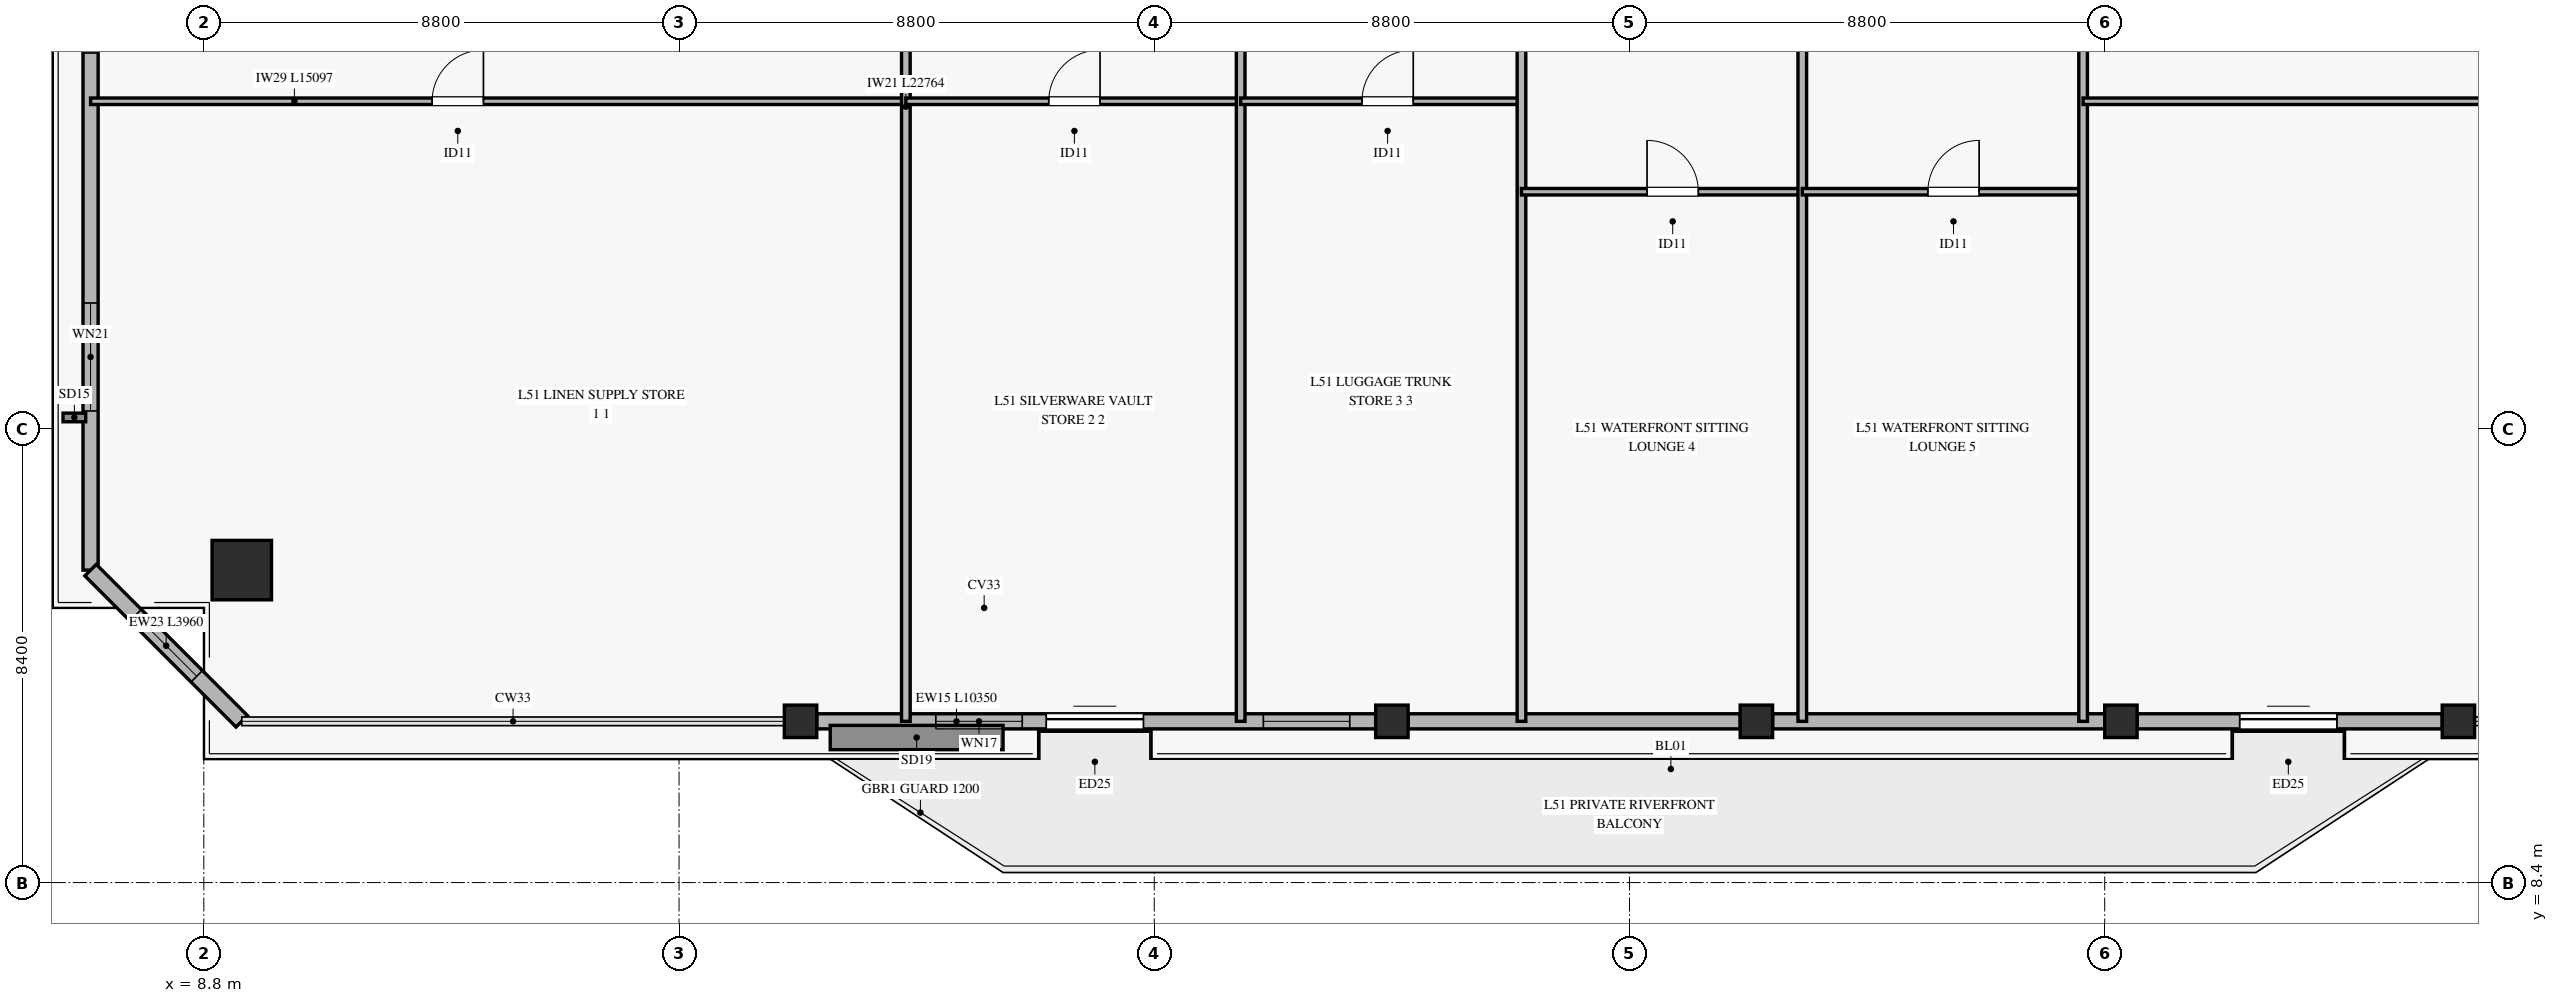
"""IFC4 building model, lengths in metres.
Left out: names, types, materials, properties, quantities, classifications, styles, units other than length and angle.
Written with IfcOpenShell. Run it as: python <this file> out.ifc"""

import sys

from ifc_helpers import new_model, si_unit, direction, frame, frame_2d, origin, origin_2d, place, context, subcontext, project, spatial, rectangle, hollow_rectangle, extrude, source, transform, mapped, element, fill, save


model = new_model("IFC4")
c1 = context("Model", 3, precision=1e-05, world=origin(), true_north=direction((0.0, 1.0)))
c2 = subcontext(c1, "Body", "Model", "MODEL_VIEW")
j1 = project(units=[si_unit("LENGTHUNIT", "METRE"), si_unit("PLANEANGLEUNIT", "RADIAN")], contexts=[c1])
p1 = place(None, origin())
s1 = spatial("IfcSite", under=j1, at=p1, CompositionType="ELEMENT")
p2 = place(p1, origin())
s2 = spatial("IfcBuilding", under=s1, at=p2, CompositionType="ELEMENT")
p3 = place(p2, frame((0.0, 0.0, 202.7)))
s3 = spatial("IfcBuildingStorey", under=s2, at=p3, CompositionType="ELEMENT", Elevation=202.7)
m1 = source(origin(), c2, "Body", "SweptSolid", [
    extrude(hollow_rectangle(XDim=1.1, YDim=1.1, WallThickness=0.05, at=origin_2d()), origin(), (0.0, 0.0, 1.0), 3.27),
])
p4 = place(p3, frame((9.503, 14.186, 0.0), z_axis=(0.0, 0.0, 1.0), x_axis=(1.0, 0.0, 0.0)))
e1 = element("IfcColumn", 1, at=p4, inside=s3, PredefinedType="COLUMN", context=c2, shape_type="MappedRepresentation", body=[
    mapped(m1, transform((0.0, 0.0, 0.0), x_axis=(1.0, 0.0, 0.0), y_axis=(0.0, 1.0, 0.0), z_axis=(0.0, 0.0, 1.0), scale=1.0)),
])
m2 = source(origin(), c2, "Body", "SweptSolid", [
    extrude(hollow_rectangle(XDim=0.6, YDim=0.6, WallThickness=0.028, at=origin_2d()), origin(), (0.0, 0.0, 1.0), 3.27),
])
for number, where, z_axis, x_axis in (
    (2, (19.85, 11.386, 0.0), (0.0, 0.0, 1.0), (1.0, 0.0, 0.0)),
    (3, (30.8, 11.386, 0.0), (0.0, 0.0, 1.0), (1.0, 0.0, 0.0)),
    (4, (37.55, 11.386, 0.0), (0.0, 0.0, 1.0), (1.0, 0.0, 0.0)),
    (5, (44.3, 11.386, 0.0), (0.0, 0.0, 1.0), (1.0, 0.0, 0.0)),
    (6, (50.55, 11.386, 0.0), (0.0, 0.0, 1.0), (1.0, 0.0, 0.0)),
):
    element("IfcColumn", number, at=place(p3, frame(where, z_axis=z_axis, x_axis=x_axis)), inside=s3, PredefinedType="COLUMN", context=c2, shape_type="MappedRepresentation", body=[
        mapped(m2, transform((0.0, 0.0, 0.0), x_axis=(1.0, 0.0, 0.0), y_axis=(0.0, 1.0, 0.0), z_axis=(0.0, 0.0, 1.0), scale=1.0)),
    ])
p5 = place(p3, frame((20.15, 11.386, 0.0), z_axis=(0.0, 0.0, 1.0), x_axis=(1.0, 0.0, 0.0)))
e7 = element("IfcWall", 7, at=p5, inside=s3, PredefinedType="SOLIDWALL", context=c2, shape_type="SweptSolid", body=[
    extrude(rectangle(XDim=10.35, YDim=0.28, at=frame_2d((5.175, 0.0))), origin(), (0.0, 0.0, 1.0), 2.75),
])
p6 = place(p5, frame((4.25, 0.0, 0.0)))
e8 = element("IfcOpeningElement", 8, at=p6, cuts=e7, PredefinedType="OPENING", context=c2, shape_type="SweptSolid", body=[
    extrude(rectangle(XDim=1.8, YDim=2.25, at=frame_2d((0.9, 1.125))), frame((0.0, 0.15, 0.0), z_axis=(0.0, -1.0, 0.0), x_axis=(1.0, 0.0, 0.0)), (0.0, 0.0, 1.0), 0.3),
])
p7 = place(p5, frame((2.205, 0.0, 0.45)))
e9 = element("IfcOpeningElement", 9, at=p7, cuts=e7, PredefinedType="OPENING", context=c2, shape_type="SweptSolid", body=[
    extrude(rectangle(XDim=1.6, YDim=2.0, at=frame_2d((0.8, 1.0))), frame((0.0, 0.15, 0.0), z_axis=(0.0, -1.0, 0.0), x_axis=(1.0, 0.0, 0.0)), (0.0, 0.0, 1.0), 0.3),
])
p8 = place(p5, frame((8.27, 0.0, 0.45)))
e10 = element("IfcOpeningElement", 10, at=p8, cuts=e7, PredefinedType="OPENING", context=c2, shape_type="SweptSolid", body=[
    extrude(rectangle(XDim=1.6, YDim=2.0, at=frame_2d((0.8, 1.0))), frame((0.0, 0.15, 0.0), z_axis=(0.0, -1.0, 0.0), x_axis=(1.0, 0.0, 0.0)), (0.0, 0.0, 1.0), 0.3),
])
for number, where, z_axis, x_axis in (
    (11, (31.1, 11.386, 0.0), (0.0, 0.0, 1.0), (1.0, 0.0, 0.0)),
    (12, (37.85, 11.386, 0.0), (0.0, 0.0, 1.0), (1.0, 0.0, 0.0)),
):
    element("IfcWall", number, at=place(p3, frame(where, z_axis=z_axis, x_axis=x_axis)), inside=s3, PredefinedType="SOLIDWALL", context=c2, shape_type="SweptSolid", body=[
        extrude(rectangle(XDim=6.15, YDim=0.28, at=frame_2d((3.075, 0.0))), origin(), (0.0, 0.0, 1.0), 2.75),
    ])
p9 = place(p3, frame((44.6, 11.386, 0.0), z_axis=(0.0, 0.0, 1.0), x_axis=(1.0, 0.0, 0.0)))
e13 = element("IfcWall", 13, at=p9, inside=s3, PredefinedType="SOLIDWALL", context=c2, shape_type="SweptSolid", body=[
    extrude(rectangle(XDim=5.65, YDim=0.28, at=frame_2d((2.825, 0.0))), origin(), (0.0, 0.0, 1.0), 2.75),
])
p10 = place(p9, frame((1.9, 0.0, 0.0)))
e14 = element("IfcOpeningElement", 14, at=p10, cuts=e13, PredefinedType="OPENING", context=c2, shape_type="SweptSolid", body=[
    extrude(rectangle(XDim=1.8, YDim=2.25, at=frame_2d((0.9, 1.125))), frame((0.0, 0.15, 0.0), z_axis=(0.0, -1.0, 0.0), x_axis=(1.0, 0.0, 0.0)), (0.0, 0.0, 1.0), 0.3),
])
p11 = place(p3, frame((6.703, 14.186, 0.0), z_axis=(0.0, 0.0, 1.0), x_axis=(0.0, 1.0, 0.0)))
e15 = element("IfcWall", 15, at=p11, inside=s3, PredefinedType="SOLIDWALL", context=c2, shape_type="SweptSolid", body=[
    extrude(rectangle(XDim=14.257, YDim=0.28, at=frame_2d((7.128, 0.0))), origin(), (0.0, 0.0, 1.0), 2.75),
])
p12 = place(p11, frame((2.947, 0.0, 0.45)))
e16 = element("IfcOpeningElement", 16, at=p12, cuts=e15, PredefinedType="OPENING", context=c2, shape_type="SweptSolid", body=[
    extrude(rectangle(XDim=2.0, YDim=2.0, at=frame_2d((1.0, 1.0))), frame((0.0, 0.15, 0.0), z_axis=(0.0, -1.0, 0.0), x_axis=(1.0, 0.0, 0.0)), (0.0, 0.0, 1.0), 0.3),
])
p13 = place(p11, frame((9.575, 0.0, 0.45)))
e17 = element("IfcOpeningElement", 17, at=p13, cuts=e15, PredefinedType="OPENING", context=c2, shape_type="SweptSolid", body=[
    extrude(rectangle(XDim=2.0, YDim=2.0, at=frame_2d((1.0, 1.0))), frame((0.0, 0.15, 0.0), z_axis=(0.0, -1.0, 0.0), x_axis=(1.0, 0.0, 0.0)), (0.0, 0.0, 1.0), 0.3),
])
p14 = place(p3, frame((6.703, 14.186, 0.0), z_axis=(0.0, 0.0, 1.0), x_axis=(0.707106781187, -0.707106781187, 0.0)))
e18 = element("IfcWall", 18, at=p14, inside=s3, PredefinedType="SOLIDWALL", context=c2, shape_type="SweptSolid", body=[
    extrude(rectangle(XDim=3.96, YDim=0.3, at=frame_2d((1.98, 0.0))), origin(), (0.0, 0.0, 1.0), 2.75),
])
p15 = place(p14, frame((1.18, 0.0, 0.45)))
e19 = element("IfcOpeningElement", 19, at=p15, cuts=e18, PredefinedType="OPENING", context=c2, shape_type="SweptSolid", body=[
    extrude(rectangle(XDim=1.6, YDim=2.0, at=frame_2d((0.8, 1.0))), frame((0.0, 0.16, 0.0), z_axis=(0.0, -1.0, 0.0), x_axis=(1.0, 0.0, 0.0)), (0.0, 0.0, 1.0), 0.32),
])
p16 = place(p3, frame((6.703, 22.868, 0.0), z_axis=(0.0, 0.0, 1.0), x_axis=(1.0, 0.0, 0.0)))
e20 = element("IfcWall", 20, at=p16, inside=s3, PredefinedType="PARTITIONING", context=c2, shape_type="SweptSolid", body=[
    extrude(rectangle(XDim=15.097, YDim=0.12, at=frame_2d((7.549, 0.0))), origin(), (0.0, 0.0, 1.0), 2.455),
])
p17 = place(p16, frame((6.325, 0.0, 0.0)))
e21 = element("IfcOpeningElement", 21, at=p17, cuts=e20, PredefinedType="OPENING", context=c2, shape_type="SweptSolid", body=[
    extrude(rectangle(XDim=0.95, YDim=2.1, at=frame_2d((0.475, 1.05))), frame((0.0, 0.07, 0.0), z_axis=(0.0, -1.0, 0.0), x_axis=(1.0, 0.0, 0.0)), (0.0, 0.0, 1.0), 0.14),
])
p18 = place(p3, frame((21.8, 11.386, 0.0), z_axis=(0.0, 0.0, 1.0), x_axis=(0.0, 1.0, 0.0)))
e22 = element("IfcWall", 22, at=p18, inside=s3, PredefinedType="PARTITIONING", context=c2, shape_type="SweptSolid", body=[
    extrude(rectangle(XDim=22.764, YDim=0.16, at=frame_2d((11.382, 0.0))), origin(), (0.0, 0.0, 1.0), 2.755),
])
p19 = place(p3, frame((21.8, 22.868, 0.0), z_axis=(0.0, 0.0, 1.0), x_axis=(1.0, 0.0, 0.0)))
e23 = element("IfcWall", 23, at=p19, inside=s3, PredefinedType="PARTITIONING", context=c2, shape_type="SweptSolid", body=[
    extrude(rectangle(XDim=6.2, YDim=0.12, at=frame_2d((3.1, 0.0))), origin(), (0.0, 0.0, 1.0), 3.27),
])
p20 = place(p19, frame((2.646, 0.0, 0.0)))
e24 = element("IfcOpeningElement", 24, at=p20, cuts=e23, PredefinedType="OPENING", context=c2, shape_type="SweptSolid", body=[
    extrude(rectangle(XDim=0.95, YDim=2.1, at=frame_2d((0.475, 1.05))), frame((0.0, 0.07, 0.0), z_axis=(0.0, -1.0, 0.0), x_axis=(1.0, 0.0, 0.0)), (0.0, 0.0, 1.0), 0.14),
])
p21 = place(p3, frame((28.0, 11.386, 0.0), z_axis=(0.0, 0.0, 1.0), x_axis=(0.0, 1.0, 0.0)))
e25 = element("IfcWall", 25, at=p21, inside=s3, PredefinedType="PARTITIONING", context=c2, shape_type="SweptSolid", body=[
    extrude(rectangle(XDim=22.764, YDim=0.16, at=frame_2d((11.382, 0.0))), origin(), (0.0, 0.0, 1.0), 2.755),
])
p22 = place(p3, frame((28.0, 22.868, 0.0), z_axis=(0.0, 0.0, 1.0), x_axis=(1.0, 0.0, 0.0)))
e26 = element("IfcWall", 26, at=p22, inside=s3, PredefinedType="PARTITIONING", context=c2, shape_type="SweptSolid", body=[
    extrude(rectangle(XDim=5.2, YDim=0.12, at=frame_2d((2.6, 0.0))), origin(), (0.0, 0.0, 1.0), 2.455),
])
p23 = place(p22, frame((2.246, 0.0, 0.0)))
e27 = element("IfcOpeningElement", 27, at=p23, cuts=e26, PredefinedType="OPENING", context=c2, shape_type="SweptSolid", body=[
    extrude(rectangle(XDim=0.95, YDim=2.1, at=frame_2d((0.475, 1.05))), frame((0.0, 0.07, 0.0), z_axis=(0.0, -1.0, 0.0), x_axis=(1.0, 0.0, 0.0)), (0.0, 0.0, 1.0), 0.14),
])
p24 = place(p3, frame((33.2, 11.386, 0.0), z_axis=(0.0, 0.0, 1.0), x_axis=(0.0, 1.0, 0.0)))
e28 = element("IfcWall", 28, at=p24, inside=s3, PredefinedType="PARTITIONING", context=c2, shape_type="SweptSolid", body=[
    extrude(rectangle(XDim=22.764, YDim=0.16, at=frame_2d((11.382, 0.0))), origin(), (0.0, 0.0, 1.0), 2.755),
])
p25 = place(p3, frame((33.2, 21.193, 0.0), z_axis=(0.0, 0.0, 1.0), x_axis=(1.0, 0.0, 0.0)))
e29 = element("IfcWall", 29, at=p25, inside=s3, PredefinedType="PARTITIONING", context=c2, shape_type="SweptSolid", body=[
    extrude(rectangle(XDim=5.2, YDim=0.12, at=frame_2d((2.6, 0.0))), origin(), (0.0, 0.0, 1.0), 2.455),
])
p26 = place(p25, frame((2.325, 0.0, 0.0)))
e30 = element("IfcOpeningElement", 30, at=p26, cuts=e29, PredefinedType="OPENING", context=c2, shape_type="SweptSolid", body=[
    extrude(rectangle(XDim=0.95, YDim=2.1, at=frame_2d((0.475, 1.05))), frame((0.0, 0.07, 0.0), z_axis=(0.0, -1.0, 0.0), x_axis=(1.0, 0.0, 0.0)), (0.0, 0.0, 1.0), 0.14),
])
p27 = place(p3, frame((38.4, 11.386, 0.0), z_axis=(0.0, 0.0, 1.0), x_axis=(0.0, 1.0, 0.0)))
e31 = element("IfcWall", 31, at=p27, inside=s3, PredefinedType="PARTITIONING", context=c2, shape_type="SweptSolid", body=[
    extrude(rectangle(XDim=22.764, YDim=0.16, at=frame_2d((11.382, 0.0))), origin(), (0.0, 0.0, 1.0), 2.755),
])
p28 = place(p3, frame((38.4, 21.193, 0.0), z_axis=(0.0, 0.0, 1.0), x_axis=(1.0, 0.0, 0.0)))
e32 = element("IfcWall", 32, at=p28, inside=s3, PredefinedType="PARTITIONING", context=c2, shape_type="SweptSolid", body=[
    extrude(rectangle(XDim=5.2, YDim=0.12, at=frame_2d((2.6, 0.0))), origin(), (0.0, 0.0, 1.0), 3.27),
])
p29 = place(p28, frame((2.325, 0.0, 0.0)))
e33 = element("IfcOpeningElement", 33, at=p29, cuts=e32, PredefinedType="OPENING", context=c2, shape_type="SweptSolid", body=[
    extrude(rectangle(XDim=0.95, YDim=2.1, at=frame_2d((0.475, 1.05))), frame((0.0, 0.07, 0.0), z_axis=(0.0, -1.0, 0.0), x_axis=(1.0, 0.0, 0.0)), (0.0, 0.0, 1.0), 0.14),
])
p30 = place(p3, frame((43.6, 11.386, 0.0), z_axis=(0.0, 0.0, 1.0), x_axis=(0.0, 1.0, 0.0)))
e34 = element("IfcWall", 34, at=p30, inside=s3, PredefinedType="PARTITIONING", context=c2, shape_type="SweptSolid", body=[
    extrude(rectangle(XDim=22.764, YDim=0.16, at=frame_2d((11.382, 0.0))), origin(), (0.0, 0.0, 1.0), 2.755),
])
p31 = place(p3, frame((43.6, 22.868, 0.0), z_axis=(0.0, 0.0, 1.0), x_axis=(1.0, 0.0, 0.0)))
e35 = element("IfcWall", 35, at=p31, inside=s3, PredefinedType="PARTITIONING", context=c2, shape_type="SweptSolid", body=[
    extrude(rectangle(XDim=20.098, YDim=0.12, at=frame_2d((10.049, 0.0))), origin(), (0.0, 0.0, 1.0), 2.455),
])
p32 = place(p31, frame((8.125, 0.0, 0.0)))
e36 = element("IfcOpeningElement", 36, at=p32, cuts=e35, PredefinedType="OPENING", context=c2, shape_type="SweptSolid", body=[
    extrude(rectangle(XDim=0.95, YDim=2.1, at=frame_2d((0.475, 1.05))), frame((0.0, 0.07, 0.0), z_axis=(0.0, -1.0, 0.0), x_axis=(1.0, 0.0, 0.0)), (0.0, 0.0, 1.0), 0.14),
])
m3 = source(origin(), c2, "Body", "SweptSolid", [
    extrude(rectangle(XDim=1.8, YDim=2.25, at=frame_2d((0.9, 1.125))), frame((0.0, 0.025, 0.0), z_axis=(0.0, -1.0, 0.0), x_axis=(1.0, 0.0, 0.0)), (0.0, 0.0, 1.0), 0.05),
])
p33 = place(p6, origin())
e37 = element("IfcDoor", 37, at=p33, inside=s3, OperationType="SLIDING_TO_LEFT", PredefinedType="DOOR", context=c2, shape_type="MappedRepresentation", body=[
    mapped(m3, transform((0.0, 0.0, 0.0), x_axis=(1.0, 0.0, 0.0), y_axis=(0.0, 1.0, 0.0), z_axis=(0.0, 0.0, 1.0), scale=1.0)),
])
fill(e8, e37)
m4 = source(origin(), c2, "Body", "SweptSolid", [
    extrude(rectangle(XDim=1.6, YDim=2.0, at=frame_2d((0.8, 1.0))), frame((0.0, 0.03, 0.0), z_axis=(0.0, -1.0, 0.0), x_axis=(1.0, 0.0, 0.0)), (0.0, 0.0, 1.0), 0.06),
])
p34 = place(p7, origin())
e38 = element("IfcWindow", 38, at=p34, inside=s3, PartitioningType="SINGLE_PANEL", PredefinedType="WINDOW", context=c2, shape_type="MappedRepresentation", body=[
    mapped(m4, transform((0.0, 0.0, 0.0), x_axis=(1.0, 0.0, 0.0), y_axis=(0.0, 1.0, 0.0), z_axis=(0.0, 0.0, 1.0), scale=1.0)),
])
fill(e9, e38)
p35 = place(p8, origin())
e39 = element("IfcWindow", 39, at=p35, inside=s3, PartitioningType="SINGLE_PANEL", PredefinedType="WINDOW", context=c2, shape_type="MappedRepresentation", body=[
    mapped(m4, transform((0.0, 0.0, 0.0), x_axis=(1.0, 0.0, 0.0), y_axis=(0.0, 1.0, 0.0), z_axis=(0.0, 0.0, 1.0), scale=1.0)),
])
fill(e10, e39)
p36 = place(p10, origin())
e40 = element("IfcDoor", 40, at=p36, inside=s3, OperationType="SLIDING_TO_LEFT", PredefinedType="DOOR", context=c2, shape_type="MappedRepresentation", body=[
    mapped(m3, transform((0.0, 0.0, 0.0), x_axis=(1.0, 0.0, 0.0), y_axis=(0.0, 1.0, 0.0), z_axis=(0.0, 0.0, 1.0), scale=1.0)),
])
fill(e14, e40)
m5 = source(origin(), c2, "Body", "SweptSolid", [
    extrude(rectangle(XDim=2.0, YDim=2.0, at=frame_2d((1.0, 1.0))), frame((0.0, 0.03, 0.0), z_axis=(0.0, -1.0, 0.0), x_axis=(1.0, 0.0, 0.0)), (0.0, 0.0, 1.0), 0.06),
])
p37 = place(p12, origin())
e41 = element("IfcWindow", 41, at=p37, inside=s3, PartitioningType="SINGLE_PANEL", PredefinedType="WINDOW", context=c2, shape_type="MappedRepresentation", body=[
    mapped(m5, transform((0.0, 0.0, 0.0), x_axis=(1.0, 0.0, 0.0), y_axis=(0.0, 1.0, 0.0), z_axis=(0.0, 0.0, 1.0), scale=1.0)),
])
fill(e16, e41)
p38 = place(p13, origin())
e42 = element("IfcWindow", 42, at=p38, inside=s3, PartitioningType="SINGLE_PANEL", PredefinedType="WINDOW", context=c2, shape_type="MappedRepresentation", body=[
    mapped(m5, transform((0.0, 0.0, 0.0), x_axis=(1.0, 0.0, 0.0), y_axis=(0.0, 1.0, 0.0), z_axis=(0.0, 0.0, 1.0), scale=1.0)),
])
fill(e17, e42)
p39 = place(p15, origin())
e43 = element("IfcWindow", 43, at=p39, inside=s3, PartitioningType="SINGLE_PANEL", PredefinedType="WINDOW", context=c2, shape_type="MappedRepresentation", body=[
    mapped(m4, transform((0.0, 0.0, 0.0), x_axis=(1.0, 0.0, 0.0), y_axis=(0.0, 1.0, 0.0), z_axis=(0.0, 0.0, 1.0), scale=1.0)),
])
fill(e19, e43)
m6 = source(origin(), c2, "Body", "SweptSolid", [
    extrude(rectangle(XDim=0.95, YDim=2.1, at=frame_2d((0.475, 1.05))), frame((0.0, 0.025, 0.0), z_axis=(0.0, -1.0, 0.0), x_axis=(1.0, 0.0, 0.0)), (0.0, 0.0, 1.0), 0.05),
])
p40 = place(p17, origin())
e44 = element("IfcDoor", 44, at=p40, inside=s3, OperationType="SINGLE_SWING_RIGHT", PredefinedType="DOOR", context=c2, shape_type="MappedRepresentation", body=[
    mapped(m6, transform((0.0, 0.0, 0.0), x_axis=(1.0, 0.0, 0.0), y_axis=(0.0, 1.0, 0.0), z_axis=(0.0, 0.0, 1.0), scale=1.0)),
])
fill(e21, e44)
p41 = place(p20, origin())
e45 = element("IfcDoor", 45, at=p41, inside=s3, OperationType="SINGLE_SWING_RIGHT", PredefinedType="DOOR", context=c2, shape_type="MappedRepresentation", body=[
    mapped(m6, transform((0.0, 0.0, 0.0), x_axis=(1.0, 0.0, 0.0), y_axis=(0.0, 1.0, 0.0), z_axis=(0.0, 0.0, 1.0), scale=1.0)),
])
fill(e24, e45)
p42 = place(p23, origin())
e46 = element("IfcDoor", 46, at=p42, inside=s3, OperationType="SINGLE_SWING_RIGHT", PredefinedType="DOOR", context=c2, shape_type="MappedRepresentation", body=[
    mapped(m6, transform((0.0, 0.0, 0.0), x_axis=(1.0, 0.0, 0.0), y_axis=(0.0, 1.0, 0.0), z_axis=(0.0, 0.0, 1.0), scale=1.0)),
])
fill(e27, e46)
p43 = place(p26, origin())
e47 = element("IfcDoor", 47, at=p43, inside=s3, OperationType="SINGLE_SWING_LEFT", PredefinedType="DOOR", context=c2, shape_type="MappedRepresentation", body=[
    mapped(m6, transform((0.0, 0.0, 0.0), x_axis=(1.0, 0.0, 0.0), y_axis=(0.0, 1.0, 0.0), z_axis=(0.0, 0.0, 1.0), scale=1.0)),
])
fill(e30, e47)
p44 = place(p29, origin())
e48 = element("IfcDoor", 48, at=p44, inside=s3, OperationType="SINGLE_SWING_RIGHT", PredefinedType="DOOR", context=c2, shape_type="MappedRepresentation", body=[
    mapped(m6, transform((0.0, 0.0, 0.0), x_axis=(1.0, 0.0, 0.0), y_axis=(0.0, 1.0, 0.0), z_axis=(0.0, 0.0, 1.0), scale=1.0)),
])
fill(e33, e48)
save(model, sys.argv[1])
